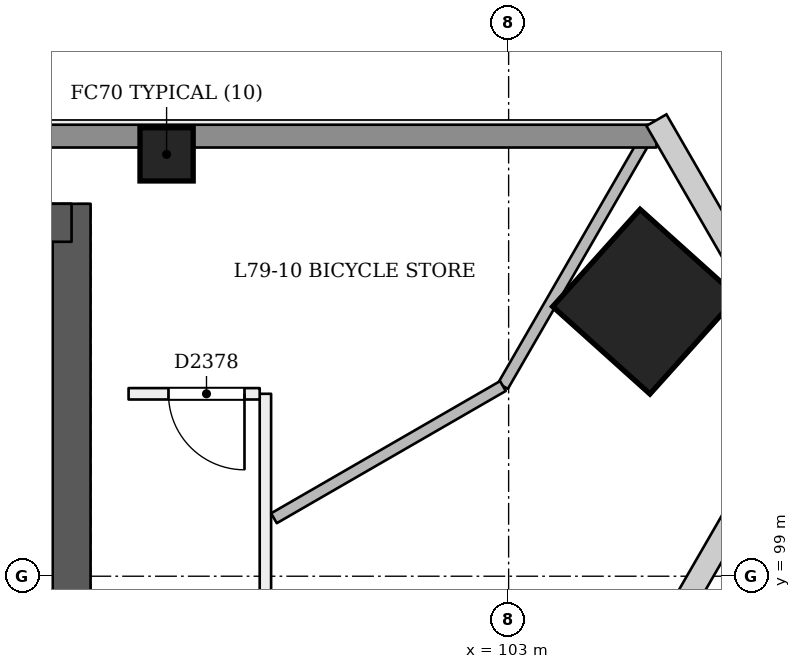
"""IFC4 building model, lengths in metres.
Left out: names, types, materials, properties, quantities, classifications, styles, units other than length and angle.
Written with IfcOpenShell. Run it as: python <this file> out.ifc"""

import sys

from ifc_helpers import new_model, si_unit, direction, frame, frame_2d, origin, origin_2d, place, context, subcontext, project, spatial, rectangle, extrude, element, fill, save


model = new_model("IFC4")
c1 = context("Model", 3, precision=1e-05, world=origin(), true_north=direction((0.0, 1.0)))
c2 = subcontext(c1, "Body", "Model", "MODEL_VIEW")
j1 = project(units=[si_unit("LENGTHUNIT", "METRE"), si_unit("PLANEANGLEUNIT", "RADIAN")], contexts=[c1])
p1 = place(None, origin())
s1 = spatial("IfcSite", under=j1, at=p1, CompositionType="ELEMENT")
p2 = place(p1, origin())
s2 = spatial("IfcBuilding", under=s1, at=p2, CompositionType="ELEMENT")
p3 = place(p2, frame((0.0, 0.0, 305.8)))
s3 = spatial("IfcBuildingStorey", under=s2, at=p3, CompositionType="ELEMENT", Elevation=305.8)
p4 = place(p3, frame((97.25, 93.15, 0.0), z_axis=(0.0, 0.0, 1.0), x_axis=(0.0, 1.0, 0.0)))
e1 = element("IfcWall", 1, at=p4, inside=s3, PredefinedType="SHEAR", context=c2, shape_type="SweptSolid", body=[
    extrude(rectangle(XDim=10.75, YDim=0.5, at=frame_2d((5.375, 0.0))), origin(), (0.0, 0.0, 1.0), 3.6),
])
p5 = place(p3, frame((97.25, 103.65, 0.0), z_axis=(0.0, 0.0, 1.0), x_axis=(-1.0, 0.0, 0.0)))
e2 = element("IfcWall", 2, at=p5, inside=s3, PredefinedType="SHEAR", context=c2, shape_type="SweptSolid", body=[
    extrude(rectangle(XDim=24.75, YDim=0.5, at=frame_2d((12.375, 0.0))), origin(), (0.0, 0.0, 1.0), 3.6),
])
p6 = place(p3, frame((104.828, 102.601, 0.0), z_axis=(-0.028403739082, 0.009219352065, 0.999554016126), x_axis=(0.500754891051, -0.865304120652, 0.022210760241)))
e3 = element("IfcColumn", 3, at=p6, inside=s3, PredefinedType="COLUMN", context=c2, shape_type="SweptSolid", body=[
    extrude(rectangle(XDim=1.72, YDim=1.72, at=origin_2d()), origin(), (0.0, 0.0, 1.0), 3.602),
])
p7 = place(p3, frame((98.5, 104.55, 0.0), z_axis=(0.0, 0.0, 1.0), x_axis=(1.0, 0.0, 0.0)))
e4 = element("IfcColumn", 4, at=p7, inside=s3, PredefinedType="COLUMN", context=c2, shape_type="SweptSolid", body=[
    extrude(rectangle(XDim=0.7, YDim=0.7, at=origin_2d()), origin(), (0.0, 0.0, 1.0), 3.6),
])
p8 = place(p3, frame((99.8, 90.7, 0.0), z_axis=(0.0, 0.0, 1.0), x_axis=(0.0, 1.0, 0.0)))
e5 = element("IfcWall", 5, at=p8, inside=s3, PredefinedType="PARTITIONING", context=c2, shape_type="SweptSolid", body=[
    extrude(rectangle(XDim=10.7, YDim=0.15, at=frame_2d((5.35, 0.0))), origin(), (0.0, 0.0, 1.0), 2.7),
])
p9 = place(p3, frame((99.725, 101.4, 0.0), z_axis=(0.0, 0.0, 1.0), x_axis=(-1.0, 0.0, 0.0)))
e6 = element("IfcWall", 6, at=p9, inside=s3, PredefinedType="PARTITIONING", context=c2, shape_type="SweptSolid", body=[
    extrude(rectangle(XDim=1.725, YDim=0.15, at=frame_2d((0.863, 0.0))), origin(), (0.0, 0.0, 1.0), 3.2),
])
p10 = place(p9, frame((0.2, 0.0, 0.0)))
e7 = element("IfcOpeningElement", 7, at=p10, cuts=e6, PredefinedType="OPENING", context=c2, shape_type="SweptSolid", body=[
    extrude(rectangle(XDim=1.0, YDim=2.1, at=frame_2d((0.5, 1.05))), frame((0.0, 0.085, 0.0), z_axis=(0.0, -1.0, 0.0), x_axis=(1.0, 0.0, 0.0)), (0.0, 0.0, 1.0), 0.171),
])
p11 = place(p3, frame((104.887, 104.9, 0.0), z_axis=(0.0, 0.0, 1.0), x_axis=(-0.500020484464, -0.866013576751, 0.0)))
e8 = element("IfcWall", 8, at=p11, inside=s3, PredefinedType="PARTITIONING", context=c2, shape_type="SweptSolid", body=[
    extrude(rectangle(XDim=3.924, YDim=0.15, at=frame_2d((1.962, 0.0))), origin(), (0.0, 0.0, 1.0), 2.7),
])
p12 = place(p3, frame((102.925, 101.502, 0.0), z_axis=(0.0, 0.0, 1.0), x_axis=(-0.86600557522, -0.500034342508, 0.0)))
e9 = element("IfcWall", 9, at=p12, inside=s3, PredefinedType="PARTITIONING", context=c2, shape_type="SweptSolid", body=[
    extrude(rectangle(XDim=3.478, YDim=0.15, at=frame_2d((1.739, 0.0))), origin(), (0.0, 0.0, 1.0), 3.2),
])
p13 = place(p3, frame((65.055, 104.79, 0.0), z_axis=(0.0, 0.0, 1.0), x_axis=(1.0, 0.0, 0.0)))
e10 = element("IfcWall", 10, at=p13, inside=s3, PredefinedType="SOLIDWALL", context=c2, shape_type="SweptSolid", body=[
    extrude(rectangle(XDim=39.889, YDim=0.3, at=frame_2d((19.945, 0.0))), origin(), (0.0, 0.0, 1.0), 2.7),
])
p14 = place(p10, origin())
e11 = element("IfcDoor", 11, at=p14, inside=s3, OperationType="SINGLE_SWING_LEFT", PredefinedType="NOTDEFINED", context=c2, shape_type="SweptSolid", body=[
    extrude(rectangle(XDim=1.0, YDim=2.1, at=frame_2d((0.5, 1.05))), frame((0.0, 0.025, 0.0), z_axis=(0.0, -1.0, 0.0), x_axis=(1.0, 0.0, 0.0)), (0.0, 0.0, 1.0), 0.05),
])
fill(e7, e11)
save(model, sys.argv[1])
